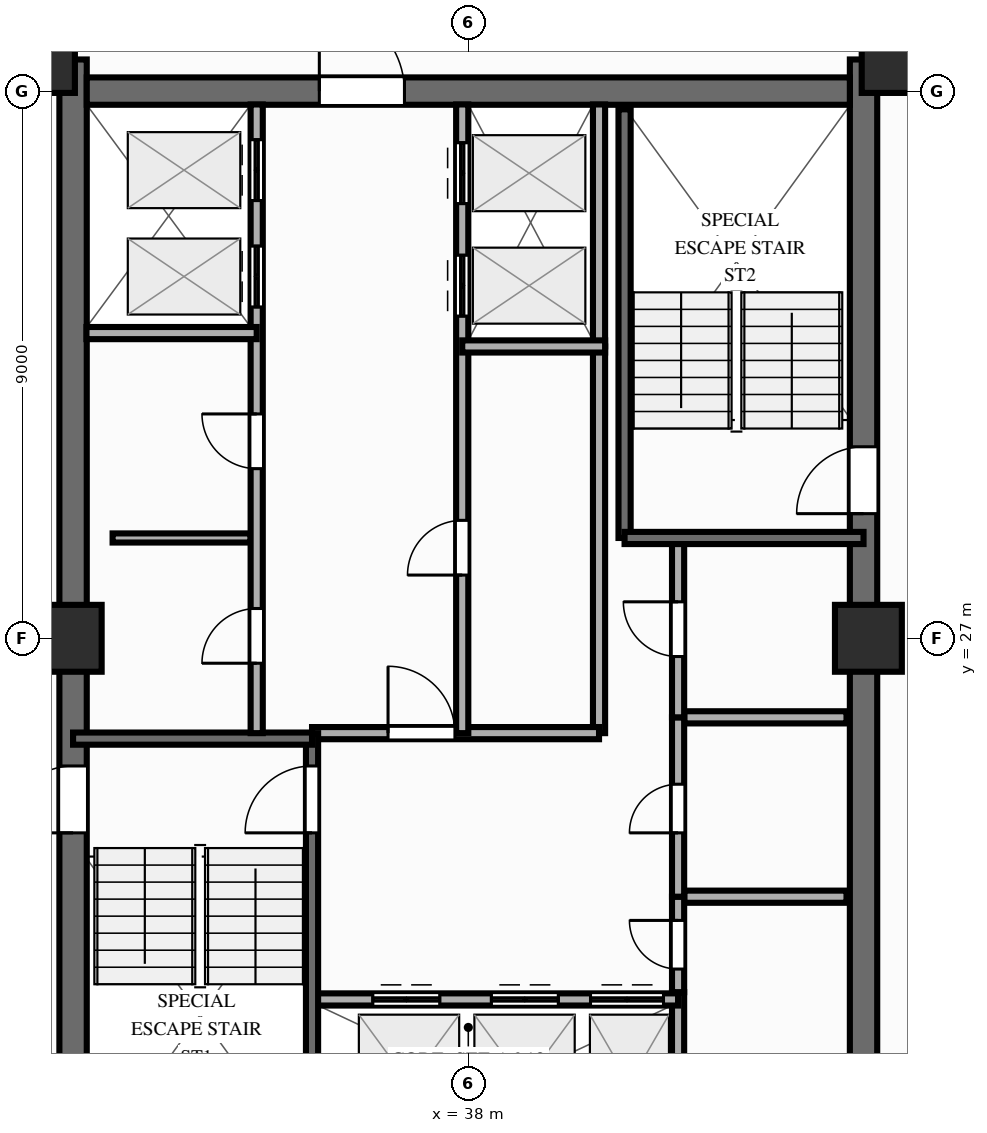
"""IFC4 building model, lengths in metres.
Left out: names, types, materials, properties, quantities, classifications, styles, units other than length and angle.
Written with IfcOpenShell. Run it as: python <this file> out.ifc"""

import sys

from ifc_helpers import new_model, si_unit, direction, frame, frame_2d, origin, origin_2d, place, context, subcontext, project, spatial, rectangle, extrude, source, transform, mapped, element, fill, save


model = new_model("IFC4")
c1 = context("Model", 3, precision=1e-05, world=origin(), true_north=direction((0.0, 1.0)))
c2 = subcontext(c1, "Body", "Model", "MODEL_VIEW")
j1 = project(units=[si_unit("LENGTHUNIT", "METRE"), si_unit("PLANEANGLEUNIT", "RADIAN")], contexts=[c1])
p1 = place(None, origin())
s1 = spatial("IfcSite", under=j1, at=p1, CompositionType="ELEMENT")
p2 = place(p1, origin())
s2 = spatial("IfcBuilding", under=s1, at=p2, CompositionType="ELEMENT")
p3 = place(p2, frame((0.0, 0.0, 196.6)))
s3 = spatial("IfcBuildingStorey", under=s2, at=p3, CompositionType="ELEMENT", Elevation=196.6)
p4 = place(p3, frame((31.5, 17.48, 0.0), z_axis=(0.0, 0.0, 1.0), x_axis=(0.0, 1.0, 0.0)))
e1 = element("IfcWall", 1, at=p4, inside=s3, PredefinedType="SHEAR", context=c2, shape_type="SweptSolid", body=[
    extrude(rectangle(XDim=19.04, YDim=0.45, at=frame_2d((9.52, 0.0))), origin(), (0.0, 0.0, 1.0), 3.0),
])
p5 = place(p4, frame((6.32, 0.0, 0.0)))
e2 = element("IfcOpeningElement", 2, at=p5, cuts=e1, PredefinedType="OPENING", context=c2, shape_type="SweptSolid", body=[
    extrude(rectangle(XDim=1.1, YDim=2.15, at=frame_2d((0.55, 1.075))), frame((0.0, 0.237, 0.0), z_axis=(0.0, -1.0, 0.0), x_axis=(1.0, 0.0, 0.0)), (0.0, 0.0, 1.0), 0.474),
])
p6 = place(p3, frame((44.5, 17.48, 0.0), z_axis=(0.0, 0.0, 1.0), x_axis=(0.0, 1.0, 0.0)))
e3 = element("IfcWall", 3, at=p6, inside=s3, PredefinedType="SHEAR", context=c2, shape_type="SweptSolid", body=[
    extrude(rectangle(XDim=19.04, YDim=0.45, at=frame_2d((9.52, 0.0))), origin(), (0.0, 0.0, 1.0), 3.0),
])
p7 = place(p6, frame((12.67, 0.0, 0.0), z_axis=(0.0, 0.0, 1.0), x_axis=(-1.0, 0.0, 0.0)))
e4 = element("IfcOpeningElement", 4, at=p7, cuts=e3, PredefinedType="OPENING", context=c2, shape_type="SweptSolid", body=[
    extrude(rectangle(XDim=1.1, YDim=2.15, at=frame_2d((0.55, 1.075))), frame((0.0, 0.237, 0.0), z_axis=(0.0, -1.0, 0.0), x_axis=(1.0, 0.0, 0.0)), (0.0, 0.0, 1.0), 0.474),
])
p8 = place(p3, frame((31.725, 36.0, 0.0), z_axis=(0.0, 0.0, 1.0), x_axis=(1.0, 0.0, 0.0)))
e5 = element("IfcWall", 5, at=p8, inside=s3, PredefinedType="SHEAR", context=c2, shape_type="SweptSolid", body=[
    extrude(rectangle(XDim=12.55, YDim=0.45, at=frame_2d((6.275, 0.0))), origin(), (0.0, 0.0, 1.0), 3.0),
])
p9 = place(p8, frame((5.225, 0.0, 0.0), z_axis=(0.0, 0.0, 1.0), x_axis=(-1.0, 0.0, 0.0)))
e6 = element("IfcOpeningElement", 6, at=p9, cuts=e5, PredefinedType="OPENING", context=c2, shape_type="SweptSolid", body=[
    extrude(rectangle(XDim=1.4, YDim=2.15, at=frame_2d((0.7, 1.075))), frame((0.0, 0.237, 0.0), z_axis=(0.0, -1.0, 0.0), x_axis=(1.0, 0.0, 0.0)), (0.0, 0.0, 1.0), 0.474),
])
m1 = source(origin(), c2, "Body", "SweptSolid", [
    extrude(rectangle(XDim=1.1, YDim=1.1, at=origin_2d()), origin(), (0.0, 0.0, 1.0), 3.0),
])
for number, where, z_axis, x_axis in (
    (7, (30.98, 36.52, 0.0), (0.0, 0.0, 1.0), (1.0, 0.0, 0.0)),
    (8, (45.02, 36.52, 0.0), (0.0, 0.0, 1.0), (1.0, 0.0, 0.0)),
    (9, (31.42, 27.0, 0.0), (0.0, 0.0, 1.0), (1.0, 0.0, 0.0)),
    (10, (44.58, 27.0, 0.0), (0.0, 0.0, 1.0), (1.0, 0.0, 0.0)),
):
    element("IfcColumn", number, at=place(p3, frame(where, z_axis=z_axis, x_axis=x_axis)), inside=s3, PredefinedType="COLUMN", context=c2, shape_type="MappedRepresentation", body=[
        mapped(m1, transform((0.0, 0.0, 0.0), scale=1.0)),
    ])
p10 = place(p3, frame((32.15, 28.65, 0.0), z_axis=(0.0, 0.0, 1.0), x_axis=(1.0, 0.0, 0.0)))
e11 = element("IfcWall", 11, at=p10, inside=s3, PredefinedType="PARTITIONING", context=c2, shape_type="SweptSolid", body=[
    extrude(rectangle(XDim=2.27, YDim=0.15, at=frame_2d((1.135, 0.0))), origin(), (0.0, 0.0, 1.0), 2.14),
])
p11 = place(p3, frame((41.55, 22.75, 0.0), z_axis=(0.0, 0.0, 1.0), x_axis=(1.0, 0.0, 0.0)))
e12 = element("IfcWall", 12, at=p11, inside=s3, PredefinedType="PARTITIONING", context=c2, shape_type="SweptSolid", body=[
    extrude(rectangle(XDim=2.67, YDim=0.2, at=frame_2d((1.335, 0.0))), origin(), (0.0, 0.0, 1.0), 2.79),
])
p12 = place(p3, frame((41.55, 25.7, 0.0), z_axis=(0.0, 0.0, 1.0), x_axis=(1.0, 0.0, 0.0)))
e13 = element("IfcWall", 13, at=p12, inside=s3, PredefinedType="PARTITIONING", context=c2, shape_type="SweptSolid", body=[
    extrude(rectangle(XDim=2.67, YDim=0.2, at=frame_2d((1.335, 0.0))), origin(), (0.0, 0.0, 1.0), 2.14),
])
p13 = place(p3, frame((41.45, 18.22, 0.0), z_axis=(0.0, 0.0, 1.0), x_axis=(0.0, 1.0, 0.0)))
e14 = element("IfcWall", 14, at=p13, inside=s3, PredefinedType="PARTITIONING", context=c2, shape_type="SweptSolid", body=[
    extrude(rectangle(XDim=2.96, YDim=0.2, at=frame_2d((1.48, 0.0))), origin(), (0.0, 0.0, 1.0), 2.79),
])
p14 = place(p3, frame((41.45, 21.18, 0.0), z_axis=(0.0, 0.0, 1.0), x_axis=(0.0, 1.0, 0.0)))
e15 = element("IfcWall", 15, at=p14, inside=s3, PredefinedType="PARTITIONING", context=c2, shape_type="SweptSolid", body=[
    extrude(rectangle(XDim=1.57, YDim=0.2, at=frame_2d((0.785, 0.0))), origin(), (0.0, 0.0, 1.0), 2.79),
])
p15 = place(p14, frame((0.38, 0.0, 0.0)))
e16 = element("IfcOpeningElement", 16, at=p15, cuts=e15, PredefinedType="OPENING", context=c2, shape_type="SweptSolid", body=[
    extrude(rectangle(XDim=0.8, YDim=2.05, at=frame_2d((0.4, 1.025))), frame((0.0, 0.112, 0.0), z_axis=(0.0, -1.0, 0.0), x_axis=(1.0, 0.0, 0.0)), (0.0, 0.0, 1.0), 0.224),
])
p16 = place(p3, frame((41.45, 22.75, 0.0), z_axis=(0.0, 0.0, 1.0), x_axis=(0.0, 1.0, 0.0)))
e17 = element("IfcWall", 17, at=p16, inside=s3, PredefinedType="PARTITIONING", context=c2, shape_type="SweptSolid", body=[
    extrude(rectangle(XDim=2.95, YDim=0.2, at=frame_2d((1.475, 0.0))), origin(), (0.0, 0.0, 1.0), 2.79),
])
p17 = place(p16, frame((1.05, 0.0, 0.0)))
e18 = element("IfcOpeningElement", 18, at=p17, cuts=e17, PredefinedType="OPENING", context=c2, shape_type="SweptSolid", body=[
    extrude(rectangle(XDim=0.8, YDim=2.05, at=frame_2d((0.4, 1.025))), frame((0.0, 0.112, 0.0), z_axis=(0.0, -1.0, 0.0), x_axis=(1.0, 0.0, 0.0)), (0.0, 0.0, 1.0), 0.224),
])
p18 = place(p3, frame((41.45, 25.7, 0.0), z_axis=(0.0, 0.0, 1.0), x_axis=(0.0, 1.0, 0.0)))
e19 = element("IfcWall", 19, at=p18, inside=s3, PredefinedType="PARTITIONING", context=c2, shape_type="SweptSolid", body=[
    extrude(rectangle(XDim=2.9, YDim=0.2, at=frame_2d((1.45, 0.0))), origin(), (0.0, 0.0, 1.0), 2.79),
])
p19 = place(p18, frame((1.0, 0.0, 0.0)))
e20 = element("IfcOpeningElement", 20, at=p19, cuts=e19, PredefinedType="OPENING", context=c2, shape_type="SweptSolid", body=[
    extrude(rectangle(XDim=0.9, YDim=2.1, at=frame_2d((0.45, 1.05))), frame((0.0, 0.112, 0.0), z_axis=(0.0, -1.0, 0.0), x_axis=(1.0, 0.0, 0.0)), (0.0, 0.0, 1.0), 0.224),
])
p20 = place(p3, frame((40.15, 25.44, 0.0), z_axis=(0.0, 0.0, 1.0), x_axis=(0.0, 1.0, 0.0)))
e21 = element("IfcWall", 21, at=p20, inside=s3, PredefinedType="PARTITIONING", context=c2, shape_type="SweptSolid", body=[
    extrude(rectangle(XDim=6.36, YDim=0.2, at=frame_2d((3.18, 0.0))), origin(), (0.0, 0.0, 1.0), 2.79),
])
p21 = place(p3, frame((40.15, 31.8, 0.0), z_axis=(0.0, 0.0, 1.0), x_axis=(0.0, 1.0, 0.0)))
e22 = element("IfcWall", 22, at=p21, inside=s3, PredefinedType="PARTITIONING", context=c2, shape_type="SweptSolid", body=[
    extrude(rectangle(XDim=3.98, YDim=0.2, at=frame_2d((1.99, 0.0))), origin(), (0.0, 0.0, 1.0), 2.79),
])
p22 = place(p3, frame((35.43, 21.06, 0.0), z_axis=(0.0, 0.0, 1.0), x_axis=(1.0, 0.0, 0.0)))
e23 = element("IfcWall", 23, at=p22, inside=s3, PredefinedType="PARTITIONING", context=c2, shape_type="SweptSolid", body=[
    extrude(rectangle(XDim=6.02, YDim=0.2, at=frame_2d((3.01, 0.0))), origin(), (0.0, 0.0, 1.0), 2.79),
])
p23 = place(p22, frame((1.0, 0.0, 0.0)))
e24 = element("IfcOpeningElement", 24, at=p23, cuts=e23, PredefinedType="OPENING", context=c2, shape_type="SweptSolid", body=[
    extrude(rectangle(XDim=1.1, YDim=2.15, at=frame_2d((0.55, 1.075))), frame((0.0, 0.112, 0.0), z_axis=(0.0, -1.0, 0.0), x_axis=(1.0, 0.0, 0.0)), (0.0, 0.0, 1.0), 0.224),
])
p24 = place(p22, frame((2.95, 0.0, 0.0)))
e25 = element("IfcOpeningElement", 25, at=p24, cuts=e23, PredefinedType="OPENING", context=c2, shape_type="SweptSolid", body=[
    extrude(rectangle(XDim=1.1, YDim=2.15, at=frame_2d((0.55, 1.075))), frame((0.0, 0.112, 0.0), z_axis=(0.0, -1.0, 0.0), x_axis=(1.0, 0.0, 0.0)), (0.0, 0.0, 1.0), 0.224),
])
p25 = place(p22, frame((4.58, 0.0, 0.0)))
e26 = element("IfcOpeningElement", 26, at=p25, cuts=e23, PredefinedType="OPENING", context=c2, shape_type="SweptSolid", body=[
    extrude(rectangle(XDim=1.2, YDim=2.15, at=frame_2d((0.6, 1.075))), frame((0.0, 0.112, 0.0), z_axis=(0.0, -1.0, 0.0), x_axis=(1.0, 0.0, 0.0)), (0.0, 0.0, 1.0), 0.224),
])
p26 = place(p3, frame((35.43, 25.44, 0.0), z_axis=(0.0, 0.0, 1.0), x_axis=(1.0, 0.0, 0.0)))
e27 = element("IfcWall", 27, at=p26, inside=s3, PredefinedType="PARTITIONING", context=c2, shape_type="SweptSolid", body=[
    extrude(rectangle(XDim=4.72, YDim=0.2, at=frame_2d((2.36, 0.0))), origin(), (0.0, 0.0, 1.0), 2.79),
])
p27 = place(p26, frame((1.25, 0.0, 0.0)))
e28 = element("IfcOpeningElement", 28, at=p27, cuts=e27, PredefinedType="OPENING", context=c2, shape_type="SweptSolid", body=[
    extrude(rectangle(XDim=1.1, YDim=2.15, at=frame_2d((0.55, 1.075))), frame((0.0, 0.112, 0.0), z_axis=(0.0, -1.0, 0.0), x_axis=(1.0, 0.0, 0.0)), (0.0, 0.0, 1.0), 0.224),
])
p28 = place(p3, frame((35.43, 18.22, 0.0), z_axis=(0.0, 0.0, 1.0), x_axis=(0.0, 1.0, 0.0)))
e29 = element("IfcWall", 29, at=p28, inside=s3, PredefinedType="SOLIDWALL", context=c2, shape_type="SweptSolid", body=[
    extrude(rectangle(XDim=7.22, YDim=0.2, at=frame_2d((3.61, 0.0))), origin(), (0.0, 0.0, 1.0), 2.79),
])
p29 = place(p28, frame((6.68, 0.0, 0.0), z_axis=(0.0, 0.0, 1.0), x_axis=(-1.0, 0.0, 0.0)))
e30 = element("IfcOpeningElement", 30, at=p29, cuts=e29, PredefinedType="OPENING", context=c2, shape_type="SweptSolid", body=[
    extrude(rectangle(XDim=1.1, YDim=2.15, at=frame_2d((0.55, 1.075))), frame((0.0, 0.112, 0.0), z_axis=(0.0, -1.0, 0.0), x_axis=(1.0, 0.0, 0.0)), (0.0, 0.0, 1.0), 0.224),
])
p30 = place(p3, frame((31.5, 25.35, 0.0), z_axis=(0.0, 0.0, 1.0), x_axis=(1.0, 0.0, 0.0)))
e31 = element("IfcWall", 31, at=p30, inside=s3, PredefinedType="SOLIDWALL", context=c2, shape_type="SweptSolid", body=[
    extrude(rectangle(XDim=3.93, YDim=0.2, at=frame_2d((1.965, 0.0))), origin(), (0.0, 0.0, 1.0), 2.79),
])
p31 = place(p3, frame((40.57, 28.65, 0.0), z_axis=(0.0, 0.0, 1.0), x_axis=(0.0, 1.0, 0.0)))
e32 = element("IfcWall", 32, at=p31, inside=s3, PredefinedType="SOLIDWALL", context=c2, shape_type="SweptSolid", body=[
    extrude(rectangle(XDim=7.05, YDim=0.2, at=frame_2d((3.525, 0.0))), origin(), (0.0, 0.0, 1.0), 2.79),
])
p32 = place(p3, frame((40.57, 28.65, 0.0), z_axis=(0.0, 0.0, 1.0), x_axis=(1.0, 0.0, 0.0)))
e33 = element("IfcWall", 33, at=p32, inside=s3, PredefinedType="SOLIDWALL", context=c2, shape_type="SweptSolid", body=[
    extrude(rectangle(XDim=3.93, YDim=0.2, at=frame_2d((1.965, 0.0))), origin(), (0.0, 0.0, 1.0), 2.79),
])
p33 = place(p3, frame((34.52, 25.44, 0.0), z_axis=(0.0, 0.0, 1.0), x_axis=(0.0, 1.0, 0.0)))
e34 = element("IfcWall", 34, at=p33, inside=s3, PredefinedType="PARTITIONING", context=c2, shape_type="SweptSolid", body=[
    extrude(rectangle(XDim=10.34, YDim=0.2, at=frame_2d((5.17, 0.0))), origin(), (0.0, 0.0, 1.0), 2.79),
])
p34 = place(p33, frame((1.15, 0.0, 0.0)))
e35 = element("IfcOpeningElement", 35, at=p34, cuts=e34, PredefinedType="OPENING", context=c2, shape_type="SweptSolid", body=[
    extrude(rectangle(XDim=0.9, YDim=2.1, at=frame_2d((0.45, 1.05))), frame((0.0, 0.112, 0.0), z_axis=(0.0, -1.0, 0.0), x_axis=(1.0, 0.0, 0.0)), (0.0, 0.0, 1.0), 0.224),
])
p35 = place(p33, frame((4.35, 0.0, 0.0)))
e36 = element("IfcOpeningElement", 36, at=p35, cuts=e34, PredefinedType="OPENING", context=c2, shape_type="SweptSolid", body=[
    extrude(rectangle(XDim=0.9, YDim=2.1, at=frame_2d((0.45, 1.05))), frame((0.0, 0.112, 0.0), z_axis=(0.0, -1.0, 0.0), x_axis=(1.0, 0.0, 0.0)), (0.0, 0.0, 1.0), 0.224),
])
p36 = place(p33, frame((7.01, 0.0, 0.0)))
e37 = element("IfcOpeningElement", 37, at=p36, cuts=e34, PredefinedType="OPENING", context=c2, shape_type="SweptSolid", body=[
    extrude(rectangle(XDim=1.0, YDim=2.15, at=frame_2d((0.5, 1.075))), frame((0.0, 0.112, 0.0), z_axis=(0.0, -1.0, 0.0), x_axis=(1.0, 0.0, 0.0)), (0.0, 0.0, 1.0), 0.224),
])
p37 = place(p33, frame((8.76, 0.0, 0.0)))
e38 = element("IfcOpeningElement", 38, at=p37, cuts=e34, PredefinedType="OPENING", context=c2, shape_type="SweptSolid", body=[
    extrude(rectangle(XDim=1.0, YDim=2.15, at=frame_2d((0.5, 1.075))), frame((0.0, 0.112, 0.0), z_axis=(0.0, -1.0, 0.0), x_axis=(1.0, 0.0, 0.0)), (0.0, 0.0, 1.0), 0.224),
])
p38 = place(p3, frame((31.72, 32.02, 0.0), z_axis=(0.0, 0.0, 1.0), x_axis=(1.0, 0.0, 0.0)))
e39 = element("IfcWall", 39, at=p38, inside=s3, PredefinedType="PARTITIONING", context=c2, shape_type="SweptSolid", body=[
    extrude(rectangle(XDim=2.8, YDim=0.2, at=frame_2d((1.4, 0.0))), origin(), (0.0, 0.0, 1.0), 2.79),
])
p39 = place(p3, frame((37.9, 25.44, 0.0), z_axis=(0.0, 0.0, 1.0), x_axis=(0.0, 1.0, 0.0)))
e40 = element("IfcWall", 40, at=p39, inside=s3, PredefinedType="PARTITIONING", context=c2, shape_type="SweptSolid", body=[
    extrude(rectangle(XDim=10.34, YDim=0.2, at=frame_2d((5.17, 0.0))), origin(), (0.0, 0.0, 1.0), 2.79),
])
p40 = place(p39, frame((2.6, 0.0, 0.0)))
e41 = element("IfcOpeningElement", 41, at=p40, cuts=e40, PredefinedType="OPENING", context=c2, shape_type="SweptSolid", body=[
    extrude(rectangle(XDim=0.9, YDim=2.1, at=frame_2d((0.45, 1.05))), frame((0.0, 0.112, 0.0), z_axis=(0.0, -1.0, 0.0), x_axis=(1.0, 0.0, 0.0)), (0.0, 0.0, 1.0), 0.224),
])
p41 = place(p39, frame((6.86, 0.0, 0.0)))
e42 = element("IfcOpeningElement", 42, at=p41, cuts=e40, PredefinedType="OPENING", context=c2, shape_type="SweptSolid", body=[
    extrude(rectangle(XDim=1.0, YDim=2.15, at=frame_2d((0.5, 1.075))), frame((0.0, 0.112, 0.0), z_axis=(0.0, -1.0, 0.0), x_axis=(1.0, 0.0, 0.0)), (0.0, 0.0, 1.0), 0.224),
])
p42 = place(p39, frame((8.71, 0.0, 0.0)))
e43 = element("IfcOpeningElement", 43, at=p42, cuts=e40, PredefinedType="OPENING", context=c2, shape_type="SweptSolid", body=[
    extrude(rectangle(XDim=1.0, YDim=2.15, at=frame_2d((0.5, 1.075))), frame((0.0, 0.112, 0.0), z_axis=(0.0, -1.0, 0.0), x_axis=(1.0, 0.0, 0.0)), (0.0, 0.0, 1.0), 0.224),
])
p43 = place(p3, frame((37.9, 31.8, 0.0), z_axis=(0.0, 0.0, 1.0), x_axis=(1.0, 0.0, 0.0)))
e44 = element("IfcWall", 44, at=p43, inside=s3, PredefinedType="PARTITIONING", context=c2, shape_type="SweptSolid", body=[
    extrude(rectangle(XDim=2.35, YDim=0.2, at=frame_2d((1.175, 0.0))), origin(), (0.0, 0.0, 1.0), 2.79),
])
m2 = source(origin(), c2, "Body", "SweptSolid", [
    extrude(rectangle(XDim=1.1, YDim=2.15, at=frame_2d((0.55, 1.075))), frame((0.0, 0.025, 0.0), z_axis=(0.0, -1.0, 0.0), x_axis=(1.0, 0.0, 0.0)), (0.0, 0.0, 1.0), 0.05),
])
p44 = place(p5, origin())
e45 = element("IfcDoor", 45, at=p44, inside=s3, OperationType="SINGLE_SWING_LEFT", PredefinedType="DOOR", context=c2, shape_type="MappedRepresentation", body=[
    mapped(m2, transform((0.0, 0.0, 0.0), scale=1.0)),
])
fill(e2, e45)
p45 = place(p7, origin())
e46 = element("IfcDoor", 46, at=p45, inside=s3, OperationType="SINGLE_SWING_RIGHT", PredefinedType="DOOR", context=c2, shape_type="MappedRepresentation", body=[
    mapped(m2, transform((0.0, 0.0, 0.0), scale=1.0)),
])
fill(e4, e46)
m3 = source(origin(), c2, "Body", "SweptSolid", [
    extrude(rectangle(XDim=1.4, YDim=2.15, at=frame_2d((0.7, 1.075))), frame((0.0, 0.025, 0.0), z_axis=(0.0, -1.0, 0.0), x_axis=(1.0, 0.0, 0.0)), (0.0, 0.0, 1.0), 0.05),
])
p46 = place(p9, origin())
e47 = element("IfcDoor", 47, at=p46, inside=s3, OperationType="SINGLE_SWING_RIGHT", PredefinedType="DOOR", context=c2, shape_type="MappedRepresentation", body=[
    mapped(m3, transform((0.0, 0.0, 0.0), scale=1.0)),
])
fill(e6, e47)
m4 = source(origin(), c2, "Body", "SweptSolid", [
    extrude(rectangle(XDim=0.8, YDim=2.05, at=frame_2d((0.4, 1.025))), frame((0.0, 0.025, 0.0), z_axis=(0.0, -1.0, 0.0), x_axis=(1.0, 0.0, 0.0)), (0.0, 0.0, 1.0), 0.05),
])
p47 = place(p15, origin())
e48 = element("IfcDoor", 48, at=p47, inside=s3, OperationType="SINGLE_SWING_RIGHT", PredefinedType="DOOR", context=c2, shape_type="MappedRepresentation", body=[
    mapped(m4, transform((0.0, 0.0, 0.0), scale=1.0)),
])
fill(e16, e48)
p48 = place(p17, origin())
e49 = element("IfcDoor", 49, at=p48, inside=s3, OperationType="SINGLE_SWING_LEFT", PredefinedType="DOOR", context=c2, shape_type="MappedRepresentation", body=[
    mapped(m4, transform((0.0, 0.0, 0.0), scale=1.0)),
])
fill(e18, e49)
m5 = source(origin(), c2, "Body", "SweptSolid", [
    extrude(rectangle(XDim=0.9, YDim=2.1, at=frame_2d((0.45, 1.05))), frame((0.0, 0.025, 0.0), z_axis=(0.0, -1.0, 0.0), x_axis=(1.0, 0.0, 0.0)), (0.0, 0.0, 1.0), 0.05),
])
p49 = place(p19, origin())
e50 = element("IfcDoor", 50, at=p49, inside=s3, OperationType="SINGLE_SWING_RIGHT", PredefinedType="DOOR", context=c2, shape_type="MappedRepresentation", body=[
    mapped(m5, transform((0.0, 0.0, 0.0), scale=1.0)),
])
fill(e20, e50)
p50 = place(p23, origin())
e51 = element("IfcDoor", 51, at=p50, inside=s3, OperationType="DOUBLE_DOOR_SLIDING", PredefinedType="DOOR", context=c2, shape_type="MappedRepresentation", body=[
    mapped(m2, transform((0.0, 0.0, 0.0), scale=1.0)),
])
fill(e24, e51)
p51 = place(p24, origin())
e52 = element("IfcDoor", 52, at=p51, inside=s3, OperationType="DOUBLE_DOOR_SLIDING", PredefinedType="DOOR", context=c2, shape_type="MappedRepresentation", body=[
    mapped(m2, transform((0.0, 0.0, 0.0), scale=1.0)),
])
fill(e25, e52)
m6 = source(origin(), c2, "Body", "SweptSolid", [
    extrude(rectangle(XDim=1.2, YDim=2.15, at=frame_2d((0.6, 1.075))), frame((0.0, 0.025, 0.0), z_axis=(0.0, -1.0, 0.0), x_axis=(1.0, 0.0, 0.0)), (0.0, 0.0, 1.0), 0.05),
])
p52 = place(p25, origin())
e53 = element("IfcDoor", 53, at=p52, inside=s3, OperationType="DOUBLE_DOOR_SLIDING", PredefinedType="DOOR", context=c2, shape_type="MappedRepresentation", body=[
    mapped(m6, transform((0.0, 0.0, 0.0), scale=1.0)),
])
fill(e26, e53)
p53 = place(p27, origin())
e54 = element("IfcDoor", 54, at=p53, inside=s3, OperationType="SINGLE_SWING_LEFT", PredefinedType="DOOR", context=c2, shape_type="MappedRepresentation", body=[
    mapped(m2, transform((0.0, 0.0, 0.0), scale=1.0)),
])
fill(e28, e54)
p54 = place(p29, origin())
e55 = element("IfcDoor", 55, at=p54, inside=s3, OperationType="SINGLE_SWING_RIGHT", PredefinedType="DOOR", context=c2, shape_type="MappedRepresentation", body=[
    mapped(m2, transform((0.0, 0.0, 0.0), scale=1.0)),
])
fill(e30, e55)
p55 = place(p34, origin())
e56 = element("IfcDoor", 56, at=p55, inside=s3, OperationType="SINGLE_SWING_LEFT", PredefinedType="DOOR", context=c2, shape_type="MappedRepresentation", body=[
    mapped(m5, transform((0.0, 0.0, 0.0), scale=1.0)),
])
fill(e35, e56)
p56 = place(p35, origin())
e57 = element("IfcDoor", 57, at=p56, inside=s3, OperationType="SINGLE_SWING_RIGHT", PredefinedType="DOOR", context=c2, shape_type="MappedRepresentation", body=[
    mapped(m5, transform((0.0, 0.0, 0.0), scale=1.0)),
])
fill(e36, e57)
m7 = source(origin(), c2, "Body", "SweptSolid", [
    extrude(rectangle(XDim=1.0, YDim=2.15, at=frame_2d((0.5, 1.075))), frame((0.0, 0.025, 0.0), z_axis=(0.0, -1.0, 0.0), x_axis=(1.0, 0.0, 0.0)), (0.0, 0.0, 1.0), 0.05),
])
p57 = place(p36, origin())
e58 = element("IfcDoor", 58, at=p57, inside=s3, OperationType="DOUBLE_DOOR_SLIDING", PredefinedType="DOOR", context=c2, shape_type="MappedRepresentation", body=[
    mapped(m7, transform((0.0, 0.0, 0.0), scale=1.0)),
])
fill(e37, e58)
p58 = place(p37, origin())
e59 = element("IfcDoor", 59, at=p58, inside=s3, OperationType="DOUBLE_DOOR_SLIDING", PredefinedType="DOOR", context=c2, shape_type="MappedRepresentation", body=[
    mapped(m7, transform((0.0, 0.0, 0.0), scale=1.0)),
])
fill(e38, e59)
p59 = place(p40, origin())
e60 = element("IfcDoor", 60, at=p59, inside=s3, OperationType="SINGLE_SWING_LEFT", PredefinedType="DOOR", context=c2, shape_type="MappedRepresentation", body=[
    mapped(m5, transform((0.0, 0.0, 0.0), scale=1.0)),
])
fill(e41, e60)
p60 = place(p41, origin())
e61 = element("IfcDoor", 61, at=p60, inside=s3, OperationType="DOUBLE_DOOR_SLIDING", PredefinedType="DOOR", context=c2, shape_type="MappedRepresentation", body=[
    mapped(m7, transform((0.0, 0.0, 0.0), scale=1.0)),
])
fill(e42, e61)
p61 = place(p42, origin())
e62 = element("IfcDoor", 62, at=p61, inside=s3, OperationType="DOUBLE_DOOR_SLIDING", PredefinedType="DOOR", context=c2, shape_type="MappedRepresentation", body=[
    mapped(m7, transform((0.0, 0.0, 0.0), scale=1.0)),
])
fill(e43, e62)
save(model, sys.argv[1])
